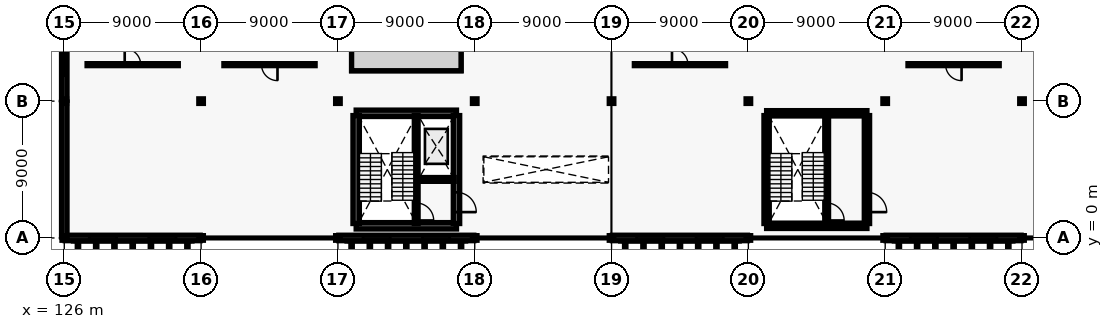
"""IFC4 building model, lengths in metres.
Left out: names, types, materials, properties, quantities, classifications, styles, units other than length and angle.
Written with IfcOpenShell. Run it as: python <this file> out.ifc"""

import sys

from ifc_helpers import new_model, si_unit, direction, frame, frame_2d, origin, origin_2d, place, context, subcontext, project, spatial, rectangle, i_section, extrude, element, fill, save


model = new_model("IFC4")
c1 = context("Model", 3, precision=1e-05, world=origin(), true_north=direction((0.0, 1.0)))
c2 = subcontext(c1, "Body", "Model", "MODEL_VIEW")
j1 = project(units=[si_unit("LENGTHUNIT", "METRE"), si_unit("PLANEANGLEUNIT", "RADIAN")], contexts=[c1])
p1 = place(None, origin())
s1 = spatial("IfcSite", under=j1, at=p1, CompositionType="ELEMENT")
p2 = place(p1, origin())
s2 = spatial("IfcBuilding", under=s1, at=p2, CompositionType="ELEMENT")
p3 = place(p2, frame((0.0, 0.0, 9.6)))
s3 = spatial("IfcBuildingStorey", under=s2, at=p3, CompositionType="ELEMENT", Elevation=9.6)
for number, where, z_axis, x_axis in (
    (1, (126.0, 0.0, 0.0), (0.0, 0.0, 1.0), (1.0, 0.0, 0.0)),
    (2, (126.0, 9.0, 0.0), (0.0, 0.0, 1.0), (1.0, 0.0, 0.0)),
    (3, (135.0, 0.0, 0.0), (0.0, 0.0, 1.0), (1.0, 0.0, 0.0)),
    (4, (135.0, 9.0, 0.0), (0.0, 0.0, 1.0), (1.0, 0.0, 0.0)),
    (5, (144.0, 0.0, 0.0), (0.0, 0.0, 1.0), (1.0, 0.0, 0.0)),
    (6, (144.0, 9.0, 0.0), (0.0, 0.0, 1.0), (1.0, 0.0, 0.0)),
    (7, (153.0, 0.0, 0.0), (0.0, 0.0, 1.0), (1.0, 0.0, 0.0)),
    (8, (153.0, 9.0, 0.0), (0.0, 0.0, 1.0), (1.0, 0.0, 0.0)),
    (9, (162.0, 0.0, 0.0), (0.0, 0.0, 1.0), (1.0, 0.0, 0.0)),
    (10, (162.0, 9.0, 0.0), (0.0, 0.0, 1.0), (1.0, 0.0, 0.0)),
    (11, (171.0, 0.0, 0.0), (0.0, 0.0, 1.0), (1.0, 0.0, 0.0)),
    (12, (171.0, 9.0, 0.0), (0.0, 0.0, 1.0), (1.0, 0.0, 0.0)),
    (13, (180.0, 0.0, 0.0), (0.0, 0.0, 1.0), (1.0, 0.0, 0.0)),
    (14, (180.0, 9.0, 0.0), (0.0, 0.0, 1.0), (1.0, 0.0, 0.0)),
    (15, (189.0, 0.0, 0.0), (0.0, 0.0, 1.0), (1.0, 0.0, 0.0)),
    (16, (189.0, 9.0, 0.0), (0.0, 0.0, 1.0), (1.0, 0.0, 0.0)),
):
    element("IfcColumn", number, at=place(p3, frame(where, z_axis=z_axis, x_axis=x_axis)), inside=s3, PredefinedType="COLUMN", context=c2, shape_type="SweptSolid", body=[
        extrude(i_section(OverallWidth=0.3, OverallDepth=0.3, WebThickness=0.011, FlangeThickness=0.019, FilletRadius=0.027, at=origin_2d()), origin(), (0.0, 0.0, 1.0), 3.9),
    ])
p4 = place(p3, frame((126.06, 0.0, 0.0), z_axis=(0.0, 0.0, 1.0), x_axis=(1.0, 0.0, 0.0)))
e17 = element("IfcWall", 17, at=p4, inside=s3, PredefinedType="SOLIDWALL", context=c2, shape_type="SweptSolid", body=[
    extrude(rectangle(XDim=8.88, YDim=0.36, at=frame_2d((4.44, 0.0))), origin(), (0.0, 0.0, 1.0), 3.25),
])
p5 = place(p4, frame((1.586, 0.0, 0.9)))
e18 = element("IfcOpeningElement", 18, at=p5, cuts=e17, PredefinedType="OPENING", context=c2, shape_type="SweptSolid", body=[
    extrude(rectangle(XDim=1.8, YDim=1.8, at=frame_2d((0.9, 0.9))), frame((0.0, 0.19, 0.0), z_axis=(0.0, -1.0, 0.0), x_axis=(1.0, 0.0, 0.0)), (0.0, 0.0, 1.0), 0.38),
])
p6 = place(p4, frame((5.494, 0.0, 0.9)))
e19 = element("IfcOpeningElement", 19, at=p6, cuts=e17, PredefinedType="OPENING", context=c2, shape_type="SweptSolid", body=[
    extrude(rectangle(XDim=1.8, YDim=1.8, at=frame_2d((0.9, 0.9))), frame((0.0, 0.19, 0.0), z_axis=(0.0, -1.0, 0.0), x_axis=(1.0, 0.0, 0.0)), (0.0, 0.0, 1.0), 0.38),
])
p7 = place(p3, frame((144.06, 0.0, 0.0), z_axis=(0.0, 0.0, 1.0), x_axis=(1.0, 0.0, 0.0)))
e20 = element("IfcWall", 20, at=p7, inside=s3, PredefinedType="SOLIDWALL", context=c2, shape_type="SweptSolid", body=[
    extrude(rectangle(XDim=8.88, YDim=0.36, at=frame_2d((4.44, 0.0))), origin(), (0.0, 0.0, 1.0), 3.25),
])
p8 = place(p7, frame((1.586, 0.0, 0.9)))
e21 = element("IfcOpeningElement", 21, at=p8, cuts=e20, PredefinedType="OPENING", context=c2, shape_type="SweptSolid", body=[
    extrude(rectangle(XDim=1.8, YDim=1.8, at=frame_2d((0.9, 0.9))), frame((0.0, 0.19, 0.0), z_axis=(0.0, -1.0, 0.0), x_axis=(1.0, 0.0, 0.0)), (0.0, 0.0, 1.0), 0.38),
])
p9 = place(p7, frame((5.494, 0.0, 0.9)))
e22 = element("IfcOpeningElement", 22, at=p9, cuts=e20, PredefinedType="OPENING", context=c2, shape_type="SweptSolid", body=[
    extrude(rectangle(XDim=1.8, YDim=1.8, at=frame_2d((0.9, 0.9))), frame((0.0, 0.19, 0.0), z_axis=(0.0, -1.0, 0.0), x_axis=(1.0, 0.0, 0.0)), (0.0, 0.0, 1.0), 0.38),
])
p10 = place(p3, frame((162.06, 0.0, 0.0), z_axis=(0.0, 0.0, 1.0), x_axis=(1.0, 0.0, 0.0)))
e23 = element("IfcWall", 23, at=p10, inside=s3, PredefinedType="SOLIDWALL", context=c2, shape_type="SweptSolid", body=[
    extrude(rectangle(XDim=8.88, YDim=0.36, at=frame_2d((4.44, 0.0))), origin(), (0.0, 0.0, 1.0), 3.25),
])
p11 = place(p10, frame((1.586, 0.0, 0.9)))
e24 = element("IfcOpeningElement", 24, at=p11, cuts=e23, PredefinedType="OPENING", context=c2, shape_type="SweptSolid", body=[
    extrude(rectangle(XDim=1.8, YDim=1.8, at=frame_2d((0.9, 0.9))), frame((0.0, 0.19, 0.0), z_axis=(0.0, -1.0, 0.0), x_axis=(1.0, 0.0, 0.0)), (0.0, 0.0, 1.0), 0.38),
])
p12 = place(p10, frame((5.494, 0.0, 0.9)))
e25 = element("IfcOpeningElement", 25, at=p12, cuts=e23, PredefinedType="OPENING", context=c2, shape_type="SweptSolid", body=[
    extrude(rectangle(XDim=1.8, YDim=1.8, at=frame_2d((0.9, 0.9))), frame((0.0, 0.19, 0.0), z_axis=(0.0, -1.0, 0.0), x_axis=(1.0, 0.0, 0.0)), (0.0, 0.0, 1.0), 0.38),
])
p13 = place(p3, frame((180.06, 0.0, 0.0), z_axis=(0.0, 0.0, 1.0), x_axis=(1.0, 0.0, 0.0)))
e26 = element("IfcWall", 26, at=p13, inside=s3, PredefinedType="SOLIDWALL", context=c2, shape_type="SweptSolid", body=[
    extrude(rectangle(XDim=8.88, YDim=0.36, at=frame_2d((4.44, 0.0))), origin(), (0.0, 0.0, 1.0), 3.25),
])
p14 = place(p13, frame((1.586, 0.0, 0.9)))
e27 = element("IfcOpeningElement", 27, at=p14, cuts=e26, PredefinedType="OPENING", context=c2, shape_type="SweptSolid", body=[
    extrude(rectangle(XDim=1.8, YDim=1.8, at=frame_2d((0.9, 0.9))), frame((0.0, 0.19, 0.0), z_axis=(0.0, -1.0, 0.0), x_axis=(1.0, 0.0, 0.0)), (0.0, 0.0, 1.0), 0.38),
])
p15 = place(p13, frame((5.494, 0.0, 0.9)))
e28 = element("IfcOpeningElement", 28, at=p15, cuts=e26, PredefinedType="OPENING", context=c2, shape_type="SweptSolid", body=[
    extrude(rectangle(XDim=1.8, YDim=1.8, at=frame_2d((0.9, 0.9))), frame((0.0, 0.19, 0.0), z_axis=(0.0, -1.0, 0.0), x_axis=(1.0, 0.0, 0.0)), (0.0, 0.0, 1.0), 0.38),
])
p16 = place(p3, frame((126.0, 0.06, 0.0), z_axis=(0.0, 0.0, 1.0), x_axis=(0.0, 1.0, 0.0)))
e29 = element("IfcWall", 29, at=p16, inside=s3, PredefinedType="SOLIDWALL", context=c2, shape_type="SweptSolid", body=[
    extrude(rectangle(XDim=8.88, YDim=0.36, at=frame_2d((4.44, 0.0))), origin(), (0.0, 0.0, 1.0), 3.25),
])
p17 = place(p3, frame((126.0, 9.06, 0.0), z_axis=(0.0, 0.0, 1.0), x_axis=(0.0, 1.0, 0.0)))
e30 = element("IfcWall", 30, at=p17, inside=s3, PredefinedType="SOLIDWALL", context=c2, shape_type="SweptSolid", body=[
    extrude(rectangle(XDim=8.88, YDim=0.36, at=frame_2d((4.44, 0.0))), origin(), (0.0, 0.0, 1.0), 3.25),
])
p18 = place(p17, frame((1.611, 0.0, 0.9)))
e31 = element("IfcOpeningElement", 31, at=p18, cuts=e30, PredefinedType="OPENING", context=c2, shape_type="SweptSolid", body=[
    extrude(rectangle(XDim=1.75, YDim=2.25, at=frame_2d((0.875, 1.125))), frame((0.0, 0.19, 0.0), z_axis=(0.0, -1.0, 0.0), x_axis=(1.0, 0.0, 0.0)), (0.0, 0.0, 1.0), 0.38),
])
p19 = place(p17, frame((5.519, 0.0, 0.9)))
e32 = element("IfcOpeningElement", 32, at=p19, cuts=e30, PredefinedType="OPENING", context=c2, shape_type="SweptSolid", body=[
    extrude(rectangle(XDim=1.75, YDim=2.25, at=frame_2d((0.875, 1.125))), frame((0.0, 0.19, 0.0), z_axis=(0.0, -1.0, 0.0), x_axis=(1.0, 0.0, 0.0)), (0.0, 0.0, 1.0), 0.38),
])
for number, where, z_axis, x_axis in (
    (33, (145.2, 0.8, 0.0), (0.0, 0.0, 1.0), (1.0, 0.0, 0.0)),
    (34, (145.2, 8.2, 0.0), (0.0, 0.0, 1.0), (1.0, 0.0, 0.0)),
):
    element("IfcWall", number, at=place(p3, frame(where, z_axis=z_axis, x_axis=x_axis)), inside=s3, PredefinedType="SHEAR", context=c2, shape_type="SweptSolid", body=[
        extrude(rectangle(XDim=6.6, YDim=0.42, at=frame_2d((3.3, 0.0))), origin(), (0.0, 0.0, 1.0), 3.9),
    ])
p20 = place(p3, frame((145.2, 0.95, 0.0), z_axis=(0.0, 0.0, 1.0), x_axis=(0.0, 1.0, 0.0)))
e35 = element("IfcWall", 35, at=p20, inside=s3, PredefinedType="SHEAR", context=c2, shape_type="SweptSolid", body=[
    extrude(rectangle(XDim=7.1, YDim=0.42, at=frame_2d((3.55, 0.0))), origin(), (0.0, 0.0, 1.0), 3.9),
])
p21 = place(p3, frame((151.8, 0.95, 0.0), z_axis=(0.0, 0.0, 1.0), x_axis=(0.0, 1.0, 0.0)))
e36 = element("IfcWall", 36, at=p21, inside=s3, PredefinedType="SHEAR", context=c2, shape_type="SweptSolid", body=[
    extrude(rectangle(XDim=7.1, YDim=0.42, at=frame_2d((3.55, 0.0))), origin(), (0.0, 0.0, 1.0), 3.9),
])
p22 = place(p21, frame((0.75, 0.0, 0.0)))
e37 = element("IfcOpeningElement", 37, at=p22, cuts=e36, PredefinedType="OPENING", context=c2, shape_type="SweptSolid", body=[
    extrude(rectangle(XDim=1.3, YDim=2.15, at=frame_2d((0.65, 1.075))), frame((0.0, 0.22, 0.0), z_axis=(0.0, -1.0, 0.0), x_axis=(1.0, 0.0, 0.0)), (0.0, 0.0, 1.0), 0.44),
])
p23 = place(p3, frame((149.15, 0.95, 0.0), z_axis=(0.0, 0.0, 1.0), x_axis=(0.0, 1.0, 0.0)))
e38 = element("IfcWall", 38, at=p23, inside=s3, PredefinedType="SHEAR", context=c2, shape_type="SweptSolid", body=[
    extrude(rectangle(XDim=7.1, YDim=0.25, at=frame_2d((3.55, 0.0))), origin(), (0.0, 0.0, 1.0), 3.9),
])
p24 = place(p23, frame((0.2, 0.0, 0.0)))
e39 = element("IfcOpeningElement", 39, at=p24, cuts=e38, PredefinedType="OPENING", context=c2, shape_type="SweptSolid", body=[
    extrude(rectangle(XDim=1.15, YDim=2.15, at=frame_2d((0.575, 1.075))), frame((0.0, 0.135, 0.0), z_axis=(0.0, -1.0, 0.0), x_axis=(1.0, 0.0, 0.0)), (0.0, 0.0, 1.0), 0.27),
])
p25 = place(p3, frame((149.27, 3.85, 0.0), z_axis=(0.0, 0.0, 1.0), x_axis=(1.0, 0.0, 0.0)))
e40 = element("IfcWall", 40, at=p25, inside=s3, PredefinedType="SHEAR", context=c2, shape_type="SweptSolid", body=[
    extrude(rectangle(XDim=2.38, YDim=0.25, at=frame_2d((1.19, 0.0))), origin(), (0.0, 0.0, 1.0), 3.9),
])
p26 = place(p25, frame((0.64, 0.0, 0.0)))
e41 = element("IfcOpeningElement", 41, at=p26, cuts=e40, PredefinedType="OPENING", context=c2, shape_type="SweptSolid", body=[
    extrude(rectangle(XDim=1.1, YDim=2.15, at=frame_2d((0.55, 1.075))), frame((0.0, 0.135, 0.0), z_axis=(0.0, -1.0, 0.0), x_axis=(1.0, 0.0, 0.0)), (0.0, 0.0, 1.0), 0.27),
])
for number, where, z_axis, x_axis in (
    (42, (172.2, 0.8, 0.0), (0.0, 0.0, 1.0), (1.0, 0.0, 0.0)),
    (43, (172.2, 8.2, 0.0), (0.0, 0.0, 1.0), (1.0, 0.0, 0.0)),
):
    element("IfcWall", number, at=place(p3, frame(where, z_axis=z_axis, x_axis=x_axis)), inside=s3, PredefinedType="SHEAR", context=c2, shape_type="SweptSolid", body=[
        extrude(rectangle(XDim=6.6, YDim=0.35, at=frame_2d((3.3, 0.0))), origin(), (0.0, 0.0, 1.0), 3.9),
    ])
p27 = place(p3, frame((172.2, 0.95, 0.0), z_axis=(0.0, 0.0, 1.0), x_axis=(0.0, 1.0, 0.0)))
e44 = element("IfcWall", 44, at=p27, inside=s3, PredefinedType="SHEAR", context=c2, shape_type="SweptSolid", body=[
    extrude(rectangle(XDim=7.1, YDim=0.35, at=frame_2d((3.55, 0.0))), origin(), (0.0, 0.0, 1.0), 3.9),
])
p28 = place(p3, frame((178.8, 0.95, 0.0), z_axis=(0.0, 0.0, 1.0), x_axis=(0.0, 1.0, 0.0)))
e45 = element("IfcWall", 45, at=p28, inside=s3, PredefinedType="SHEAR", context=c2, shape_type="SweptSolid", body=[
    extrude(rectangle(XDim=7.1, YDim=0.35, at=frame_2d((3.55, 0.0))), origin(), (0.0, 0.0, 1.0), 3.9),
])
p29 = place(p28, frame((0.75, 0.0, 0.0)))
e46 = element("IfcOpeningElement", 46, at=p29, cuts=e45, PredefinedType="OPENING", context=c2, shape_type="SweptSolid", body=[
    extrude(rectangle(XDim=1.3, YDim=2.15, at=frame_2d((0.65, 1.075))), frame((0.0, 0.185, 0.0), z_axis=(0.0, -1.0, 0.0), x_axis=(1.0, 0.0, 0.0)), (0.0, 0.0, 1.0), 0.37),
])
p30 = place(p3, frame((176.15, 0.95, 0.0), z_axis=(0.0, 0.0, 1.0), x_axis=(0.0, 1.0, 0.0)))
e47 = element("IfcWall", 47, at=p30, inside=s3, PredefinedType="SHEAR", context=c2, shape_type="SweptSolid", body=[
    extrude(rectangle(XDim=7.1, YDim=0.25, at=frame_2d((3.55, 0.0))), origin(), (0.0, 0.0, 1.0), 3.9),
])
p31 = place(p30, frame((0.2, 0.0, 0.0)))
e48 = element("IfcOpeningElement", 48, at=p31, cuts=e47, PredefinedType="OPENING", context=c2, shape_type="SweptSolid", body=[
    extrude(rectangle(XDim=1.15, YDim=2.15, at=frame_2d((0.575, 1.075))), frame((0.0, 0.135, 0.0), z_axis=(0.0, -1.0, 0.0), x_axis=(1.0, 0.0, 0.0)), (0.0, 0.0, 1.0), 0.27),
])
p32 = place(p3, frame((127.5, 11.4, 0.0), z_axis=(0.0, 0.0, 1.0), x_axis=(1.0, 0.0, 0.0)))
e49 = element("IfcWall", 49, at=p32, inside=s3, PredefinedType="PARTITIONING", context=c2, shape_type="SweptSolid", body=[
    extrude(rectangle(XDim=6.0, YDim=0.13, at=frame_2d((3.0, 0.0))), origin(), (0.0, 0.0, 1.0), 2.9),
])
p33 = place(p32, frame((2.475, 0.0, 0.0)))
e50 = element("IfcOpeningElement", 50, at=p33, cuts=e49, PredefinedType="OPENING", context=c2, shape_type="SweptSolid", body=[
    extrude(rectangle(XDim=1.05, YDim=2.15, at=frame_2d((0.525, 1.075))), frame((0.0, 0.075, 0.0), z_axis=(0.0, -1.0, 0.0), x_axis=(1.0, 0.0, 0.0)), (0.0, 0.0, 1.0), 0.15),
])
p34 = place(p3, frame((136.5, 11.4, 0.0), z_axis=(0.0, 0.0, 1.0), x_axis=(1.0, 0.0, 0.0)))
e51 = element("IfcWall", 51, at=p34, inside=s3, PredefinedType="PARTITIONING", context=c2, shape_type="SweptSolid", body=[
    extrude(rectangle(XDim=6.0, YDim=0.13, at=frame_2d((3.0, 0.0))), origin(), (0.0, 0.0, 1.0), 2.9),
])
p35 = place(p34, frame((2.475, 0.0, 0.0)))
e52 = element("IfcOpeningElement", 52, at=p35, cuts=e51, PredefinedType="OPENING", context=c2, shape_type="SweptSolid", body=[
    extrude(rectangle(XDim=1.05, YDim=2.15, at=frame_2d((0.525, 1.075))), frame((0.0, 0.075, 0.0), z_axis=(0.0, -1.0, 0.0), x_axis=(1.0, 0.0, 0.0)), (0.0, 0.0, 1.0), 0.15),
])
p36 = place(p3, frame((163.5, 11.4, 0.0), z_axis=(0.0, 0.0, 1.0), x_axis=(1.0, 0.0, 0.0)))
e53 = element("IfcWall", 53, at=p36, inside=s3, PredefinedType="PARTITIONING", context=c2, shape_type="SweptSolid", body=[
    extrude(rectangle(XDim=6.0, YDim=0.13, at=frame_2d((3.0, 0.0))), origin(), (0.0, 0.0, 1.0), 2.9),
])
p37 = place(p36, frame((2.475, 0.0, 0.0)))
e54 = element("IfcOpeningElement", 54, at=p37, cuts=e53, PredefinedType="OPENING", context=c2, shape_type="SweptSolid", body=[
    extrude(rectangle(XDim=1.05, YDim=2.15, at=frame_2d((0.525, 1.075))), frame((0.0, 0.075, 0.0), z_axis=(0.0, -1.0, 0.0), x_axis=(1.0, 0.0, 0.0)), (0.0, 0.0, 1.0), 0.15),
])
p38 = place(p3, frame((181.5, 11.4, 0.0), z_axis=(0.0, 0.0, 1.0), x_axis=(1.0, 0.0, 0.0)))
e55 = element("IfcWall", 55, at=p38, inside=s3, PredefinedType="PARTITIONING", context=c2, shape_type="SweptSolid", body=[
    extrude(rectangle(XDim=6.0, YDim=0.13, at=frame_2d((3.0, 0.0))), origin(), (0.0, 0.0, 1.0), 2.9),
])
p39 = place(p38, frame((2.475, 0.0, 0.0)))
e56 = element("IfcOpeningElement", 56, at=p39, cuts=e55, PredefinedType="OPENING", context=c2, shape_type="SweptSolid", body=[
    extrude(rectangle(XDim=1.05, YDim=2.15, at=frame_2d((0.525, 1.075))), frame((0.0, 0.075, 0.0), z_axis=(0.0, -1.0, 0.0), x_axis=(1.0, 0.0, 0.0)), (0.0, 0.0, 1.0), 0.15),
])
p40 = place(p5, origin())
e57 = element("IfcWindow", 57, at=p40, inside=s3, PartitioningType="SINGLE_PANEL", PredefinedType="WINDOW", context=c2, shape_type="SweptSolid", body=[
    extrude(rectangle(XDim=1.8, YDim=1.8, at=frame_2d((0.9, 0.9))), frame((0.0, 0.03, 0.0), z_axis=(0.0, -1.0, 0.0), x_axis=(1.0, 0.0, 0.0)), (0.0, 0.0, 1.0), 0.06),
])
fill(e18, e57)
p41 = place(p6, origin())
e58 = element("IfcWindow", 58, at=p41, inside=s3, PartitioningType="SINGLE_PANEL", PredefinedType="WINDOW", context=c2, shape_type="SweptSolid", body=[
    extrude(rectangle(XDim=1.8, YDim=1.8, at=frame_2d((0.9, 0.9))), frame((0.0, 0.03, 0.0), z_axis=(0.0, -1.0, 0.0), x_axis=(1.0, 0.0, 0.0)), (0.0, 0.0, 1.0), 0.06),
])
fill(e19, e58)
p42 = place(p8, origin())
e59 = element("IfcWindow", 59, at=p42, inside=s3, PartitioningType="SINGLE_PANEL", PredefinedType="WINDOW", context=c2, shape_type="SweptSolid", body=[
    extrude(rectangle(XDim=1.8, YDim=1.8, at=frame_2d((0.9, 0.9))), frame((0.0, 0.03, 0.0), z_axis=(0.0, -1.0, 0.0), x_axis=(1.0, 0.0, 0.0)), (0.0, 0.0, 1.0), 0.06),
])
fill(e21, e59)
p43 = place(p9, origin())
e60 = element("IfcWindow", 60, at=p43, inside=s3, PartitioningType="SINGLE_PANEL", PredefinedType="WINDOW", context=c2, shape_type="SweptSolid", body=[
    extrude(rectangle(XDim=1.8, YDim=1.8, at=frame_2d((0.9, 0.9))), frame((0.0, 0.03, 0.0), z_axis=(0.0, -1.0, 0.0), x_axis=(1.0, 0.0, 0.0)), (0.0, 0.0, 1.0), 0.06),
])
fill(e22, e60)
p44 = place(p11, origin())
e61 = element("IfcWindow", 61, at=p44, inside=s3, PartitioningType="SINGLE_PANEL", PredefinedType="WINDOW", context=c2, shape_type="SweptSolid", body=[
    extrude(rectangle(XDim=1.8, YDim=1.8, at=frame_2d((0.9, 0.9))), frame((0.0, 0.03, 0.0), z_axis=(0.0, -1.0, 0.0), x_axis=(1.0, 0.0, 0.0)), (0.0, 0.0, 1.0), 0.06),
])
fill(e24, e61)
p45 = place(p12, origin())
e62 = element("IfcWindow", 62, at=p45, inside=s3, PartitioningType="SINGLE_PANEL", PredefinedType="WINDOW", context=c2, shape_type="SweptSolid", body=[
    extrude(rectangle(XDim=1.8, YDim=1.8, at=frame_2d((0.9, 0.9))), frame((0.0, 0.03, 0.0), z_axis=(0.0, -1.0, 0.0), x_axis=(1.0, 0.0, 0.0)), (0.0, 0.0, 1.0), 0.06),
])
fill(e25, e62)
p46 = place(p14, origin())
e63 = element("IfcWindow", 63, at=p46, inside=s3, PartitioningType="SINGLE_PANEL", PredefinedType="WINDOW", context=c2, shape_type="SweptSolid", body=[
    extrude(rectangle(XDim=1.8, YDim=1.8, at=frame_2d((0.9, 0.9))), frame((0.0, 0.03, 0.0), z_axis=(0.0, -1.0, 0.0), x_axis=(1.0, 0.0, 0.0)), (0.0, 0.0, 1.0), 0.06),
])
fill(e27, e63)
p47 = place(p15, origin())
e64 = element("IfcWindow", 64, at=p47, inside=s3, PartitioningType="SINGLE_PANEL", PredefinedType="WINDOW", context=c2, shape_type="SweptSolid", body=[
    extrude(rectangle(XDim=1.8, YDim=1.8, at=frame_2d((0.9, 0.9))), frame((0.0, 0.03, 0.0), z_axis=(0.0, -1.0, 0.0), x_axis=(1.0, 0.0, 0.0)), (0.0, 0.0, 1.0), 0.06),
])
fill(e28, e64)
p48 = place(p18, origin())
e65 = element("IfcWindow", 65, at=p48, inside=s3, PartitioningType="SINGLE_PANEL", PredefinedType="WINDOW", context=c2, shape_type="SweptSolid", body=[
    extrude(rectangle(XDim=1.75, YDim=2.25, at=frame_2d((0.875, 1.125))), frame((0.0, 0.03, 0.0), z_axis=(0.0, -1.0, 0.0), x_axis=(1.0, 0.0, 0.0)), (0.0, 0.0, 1.0), 0.06),
])
fill(e31, e65)
p49 = place(p22, frame((1.3, 0.0, 0.0), z_axis=(0.0, 0.0, 1.0), x_axis=(-1.0, 0.0, 0.0)))
e66 = element("IfcDoor", 66, at=p49, inside=s3, OperationType="DOUBLE_DOOR_SINGLE_SWING", PredefinedType="DOOR", context=c2, shape_type="SweptSolid", body=[
    extrude(rectangle(XDim=1.3, YDim=2.15, at=frame_2d((0.65, 1.075))), frame((0.0, 0.025, 0.0), z_axis=(0.0, -1.0, 0.0), x_axis=(1.0, 0.0, 0.0)), (0.0, 0.0, 1.0), 0.05),
])
fill(e37, e66)
p50 = place(p24, frame((1.15, 0.0, 0.0), z_axis=(0.0, 0.0, 1.0), x_axis=(-1.0, 0.0, 0.0)))
e67 = element("IfcDoor", 67, at=p50, inside=s3, OperationType="SINGLE_SWING_LEFT", PredefinedType="DOOR", context=c2, shape_type="SweptSolid", body=[
    extrude(rectangle(XDim=1.15, YDim=2.15, at=frame_2d((0.575, 1.075))), frame((0.0, 0.025, 0.0), z_axis=(0.0, -1.0, 0.0), x_axis=(1.0, 0.0, 0.0)), (0.0, 0.0, 1.0), 0.05),
])
fill(e39, e67)
p51 = place(p26, origin())
e68 = element("IfcDoor", 68, at=p51, inside=s3, OperationType="SLIDING_TO_LEFT", PredefinedType="DOOR", context=c2, shape_type="SweptSolid", body=[
    extrude(rectangle(XDim=1.1, YDim=2.15, at=frame_2d((0.55, 1.075))), frame((0.0, 0.025, 0.0), z_axis=(0.0, -1.0, 0.0), x_axis=(1.0, 0.0, 0.0)), (0.0, 0.0, 1.0), 0.05),
])
fill(e41, e68)
p52 = place(p29, frame((1.3, 0.0, 0.0), z_axis=(0.0, 0.0, 1.0), x_axis=(-1.0, 0.0, 0.0)))
e69 = element("IfcDoor", 69, at=p52, inside=s3, OperationType="DOUBLE_DOOR_SINGLE_SWING", PredefinedType="DOOR", context=c2, shape_type="SweptSolid", body=[
    extrude(rectangle(XDim=1.3, YDim=2.15, at=frame_2d((0.65, 1.075))), frame((0.0, 0.025, 0.0), z_axis=(0.0, -1.0, 0.0), x_axis=(1.0, 0.0, 0.0)), (0.0, 0.0, 1.0), 0.05),
])
fill(e46, e69)
p53 = place(p31, frame((1.15, 0.0, 0.0), z_axis=(0.0, 0.0, 1.0), x_axis=(-1.0, 0.0, 0.0)))
e70 = element("IfcDoor", 70, at=p53, inside=s3, OperationType="SINGLE_SWING_LEFT", PredefinedType="DOOR", context=c2, shape_type="SweptSolid", body=[
    extrude(rectangle(XDim=1.15, YDim=2.15, at=frame_2d((0.575, 1.075))), frame((0.0, 0.025, 0.0), z_axis=(0.0, -1.0, 0.0), x_axis=(1.0, 0.0, 0.0)), (0.0, 0.0, 1.0), 0.05),
])
fill(e48, e70)
p54 = place(p33, origin())
e71 = element("IfcDoor", 71, at=p54, inside=s3, OperationType="SINGLE_SWING_LEFT", PredefinedType="DOOR", context=c2, shape_type="SweptSolid", body=[
    extrude(rectangle(XDim=1.05, YDim=2.15, at=frame_2d((0.525, 1.075))), frame((0.0, 0.025, 0.0), z_axis=(0.0, -1.0, 0.0), x_axis=(1.0, 0.0, 0.0)), (0.0, 0.0, 1.0), 0.05),
])
fill(e50, e71)
p55 = place(p35, origin())
e72 = element("IfcDoor", 72, at=p55, inside=s3, OperationType="SINGLE_SWING_RIGHT", PredefinedType="DOOR", context=c2, shape_type="SweptSolid", body=[
    extrude(rectangle(XDim=1.05, YDim=2.15, at=frame_2d((0.525, 1.075))), frame((0.0, 0.025, 0.0), z_axis=(0.0, -1.0, 0.0), x_axis=(1.0, 0.0, 0.0)), (0.0, 0.0, 1.0), 0.05),
])
fill(e52, e72)
p56 = place(p37, origin())
e73 = element("IfcDoor", 73, at=p56, inside=s3, OperationType="SINGLE_SWING_LEFT", PredefinedType="DOOR", context=c2, shape_type="SweptSolid", body=[
    extrude(rectangle(XDim=1.05, YDim=2.15, at=frame_2d((0.525, 1.075))), frame((0.0, 0.025, 0.0), z_axis=(0.0, -1.0, 0.0), x_axis=(1.0, 0.0, 0.0)), (0.0, 0.0, 1.0), 0.05),
])
fill(e54, e73)
p57 = place(p39, origin())
e74 = element("IfcDoor", 74, at=p57, inside=s3, OperationType="SINGLE_SWING_RIGHT", PredefinedType="DOOR", context=c2, shape_type="SweptSolid", body=[
    extrude(rectangle(XDim=1.05, YDim=2.15, at=frame_2d((0.525, 1.075))), frame((0.0, 0.025, 0.0), z_axis=(0.0, -1.0, 0.0), x_axis=(1.0, 0.0, 0.0)), (0.0, 0.0, 1.0), 0.05),
])
fill(e56, e74)
save(model, sys.argv[1])
